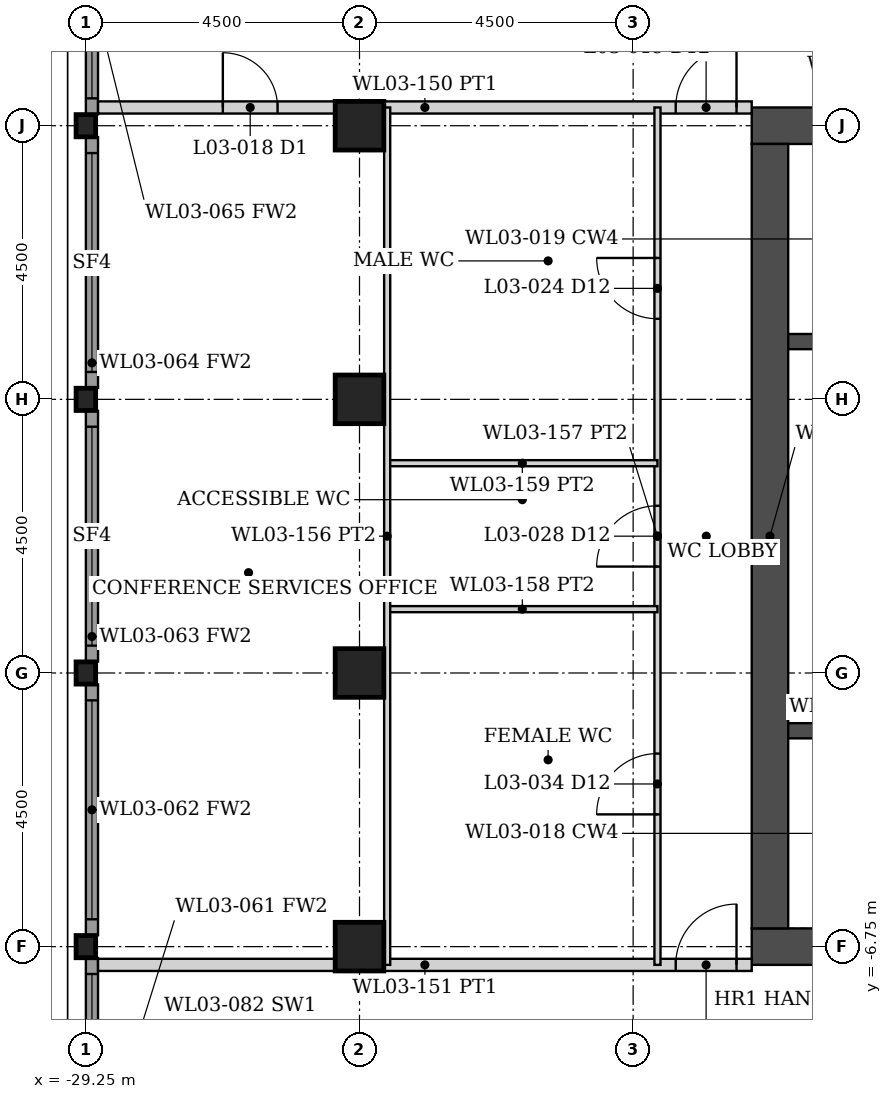
"""IFC4 building model, lengths in metres.
Left out: names, types, materials, properties, quantities, classifications, styles, units other than length and angle.
Written with IfcOpenShell. Run it as: python <this file> out.ifc"""

import sys

from ifc_helpers import new_model, si_unit, direction, frame, frame_2d, origin, origin_2d, place, context, subcontext, project, spatial, rectangle, hollow_rectangle, i_section, extrude, element, fill, save


model = new_model("IFC4")
c1 = context("Model", 3, precision=1e-05, world=origin(), true_north=direction((0.0, 1.0)))
c2 = subcontext(c1, "Body", "Model", "MODEL_VIEW")
j1 = project(units=[si_unit("LENGTHUNIT", "METRE"), si_unit("PLANEANGLEUNIT", "RADIAN")], contexts=[c1])
p1 = place(None, origin())
s1 = spatial("IfcSite", under=j1, at=p1, CompositionType="ELEMENT")
p2 = place(p1, origin())
s2 = spatial("IfcBuilding", under=s1, at=p2, CompositionType="ELEMENT")
p3 = place(p2, frame((0.0, 0.0, 16.0)))
s3 = spatial("IfcBuildingStorey", under=s2, at=p3, CompositionType="ELEMENT", Elevation=16.0)
for number, where, z_axis, x_axis in (
    (1, (-24.75, -6.75, 0.0), (0.0, 0.0, 1.0), (1.0, 0.0, 0.0)),
    (2, (-24.75, -2.25, 0.0), (0.0, 0.0, 1.0), (1.0, 0.0, 0.0)),
    (3, (-24.75, 2.25, 0.0), (0.0, 0.0, 1.0), (1.0, 0.0, 0.0)),
    (4, (-24.75, 6.75, 0.0), (0.0, 0.0, 1.0), (1.0, 0.0, 0.0)),
):
    element("IfcColumn", number, at=place(p3, frame(where, z_axis=z_axis, x_axis=x_axis)), inside=s3, PredefinedType="COLUMN", context=c2, shape_type="SweptSolid", body=[
        extrude(hollow_rectangle(XDim=0.8, YDim=0.8, WallThickness=0.08, at=origin_2d()), origin(), (0.0, 0.0, 1.0), 5.5),
    ])
for number, where, z_axis, x_axis in (
    (5, (-29.25, -6.75, 0.0), (0.0, 0.0, 1.0), (1.0, 0.0, 0.0)),
    (6, (-29.25, -2.25, 0.0), (0.0, 0.0, 1.0), (1.0, 0.0, 0.0)),
    (7, (-29.25, 2.25, 0.0), (0.0, 0.0, 1.0), (1.0, 0.0, 0.0)),
    (8, (-29.25, 6.75, 0.0), (0.0, 0.0, 1.0), (1.0, 0.0, 0.0)),
):
    element("IfcColumn", number, at=place(p3, frame(where, z_axis=z_axis, x_axis=x_axis)), inside=s3, PredefinedType="COLUMN", context=c2, shape_type="SweptSolid", body=[
        extrude(i_section(OverallWidth=0.322, OverallDepth=0.365, WebThickness=0.027, FlangeThickness=0.044, FilletRadius=0.015, at=origin_2d()), origin(), (0.0, 0.0, 1.0), 5.5),
    ])
for number, where, z_axis, x_axis in (
    (9, (-8.7, -6.75, 0.0), (0.0, 0.0, 1.0), (-1.0, 0.0, 0.0)),
    (10, (-8.7, 6.75, 0.0), (0.0, 0.0, 1.0), (-1.0, 0.0, 0.0)),
):
    element("IfcWall", number, at=place(p3, frame(where, z_axis=z_axis, x_axis=x_axis)), inside=s3, PredefinedType="SHEAR", context=c2, shape_type="SweptSolid", body=[
        extrude(rectangle(XDim=9.6, YDim=0.6, at=frame_2d((4.8, 0.0))), origin(), (0.0, 0.0, 1.0), 5.5),
    ])
p4 = place(p3, frame((-18.0, -6.45, 0.0), z_axis=(0.0, 0.0, 1.0), x_axis=(0.0, 1.0, 0.0)))
e11 = element("IfcWall", 11, at=p4, inside=s3, PredefinedType="SHEAR", context=c2, shape_type="SweptSolid", body=[
    extrude(rectangle(XDim=12.9, YDim=0.6, at=frame_2d((6.45, 0.0))), origin(), (0.0, 0.0, 1.0), 5.5),
])
p5 = place(p3, frame((-9.3, -3.2, 0.0), z_axis=(0.0, 0.0, 1.0), x_axis=(-1.0, 0.0, 0.0)))
e12 = element("IfcWall", 12, at=p5, inside=s3, PredefinedType="SHEAR", context=c2, shape_type="SweptSolid", body=[
    extrude(rectangle(XDim=8.4, YDim=0.25, at=frame_2d((4.2, 0.0))), origin(), (0.0, 0.0, 1.0), 5.5),
])
p6 = place(p5, frame((0.15, 0.0, 0.0)))
e13 = element("IfcOpeningElement", 13, at=p6, cuts=e12, PredefinedType="OPENING", context=c2, shape_type="SweptSolid", body=[
    extrude(rectangle(XDim=1.0, YDim=2.1, at=frame_2d((0.5, 1.05))), frame((0.0, 0.135, 0.0), z_axis=(0.0, -1.0, 0.0), x_axis=(1.0, 0.0, 0.0)), (0.0, 0.0, 1.0), 0.27),
])
p7 = place(p3, frame((-9.3, 3.2, 0.0), z_axis=(0.0, 0.0, 1.0), x_axis=(-1.0, 0.0, 0.0)))
e14 = element("IfcWall", 14, at=p7, inside=s3, PredefinedType="SHEAR", context=c2, shape_type="SweptSolid", body=[
    extrude(rectangle(XDim=8.4, YDim=0.25, at=frame_2d((4.2, 0.0))), origin(), (0.0, 0.0, 1.0), 5.5),
])
p8 = place(p3, frame((-29.15, -11.062, 0.0), z_axis=(0.0, 0.0, 1.0), x_axis=(0.0, 1.0, 0.0)))
e15 = element("IfcWall", 15, at=p8, inside=s3, PredefinedType="SOLIDWALL", context=c2, shape_type="SweptSolid", body=[
    extrude(rectangle(XDim=4.125, YDim=0.2, at=frame_2d((2.062, 0.0))), origin(), (0.0, 0.0, 1.0), 4.633),
])
p9 = place(p8, frame((0.262, 0.0, 0.15)))
e16 = element("IfcOpeningElement", 16, at=p9, cuts=e15, PredefinedType="OPENING", context=c2, shape_type="SweptSolid", body=[
    extrude(rectangle(XDim=3.6, YDim=4.333, at=frame_2d((1.8, 2.167))), frame((0.0, 0.11, 0.0), z_axis=(0.0, -1.0, 0.0), x_axis=(1.0, 0.0, 0.0)), (0.0, 0.0, 1.0), 0.22),
])
p10 = place(p3, frame((-29.15, -6.562, 0.0), z_axis=(0.0, 0.0, 1.0), x_axis=(0.0, 1.0, 0.0)))
e17 = element("IfcWall", 17, at=p10, inside=s3, PredefinedType="SOLIDWALL", context=c2, shape_type="SweptSolid", body=[
    extrude(rectangle(XDim=4.125, YDim=0.2, at=frame_2d((2.062, 0.0))), origin(), (0.0, 0.0, 1.0), 4.633),
])
p11 = place(p10, frame((0.262, 0.0, 0.15)))
e18 = element("IfcOpeningElement", 18, at=p11, cuts=e17, PredefinedType="OPENING", context=c2, shape_type="SweptSolid", body=[
    extrude(rectangle(XDim=3.6, YDim=4.333, at=frame_2d((1.8, 2.167))), frame((0.0, 0.11, 0.0), z_axis=(0.0, -1.0, 0.0), x_axis=(1.0, 0.0, 0.0)), (0.0, 0.0, 1.0), 0.22),
])
p12 = place(p3, frame((-29.15, -2.062, 0.0), z_axis=(0.0, 0.0, 1.0), x_axis=(0.0, 1.0, 0.0)))
e19 = element("IfcWall", 19, at=p12, inside=s3, PredefinedType="SOLIDWALL", context=c2, shape_type="SweptSolid", body=[
    extrude(rectangle(XDim=4.125, YDim=0.2, at=frame_2d((2.062, 0.0))), origin(), (0.0, 0.0, 1.0), 4.633),
])
p13 = place(p12, frame((0.262, 0.0, 0.15)))
e20 = element("IfcOpeningElement", 20, at=p13, cuts=e19, PredefinedType="OPENING", context=c2, shape_type="SweptSolid", body=[
    extrude(rectangle(XDim=3.6, YDim=4.333, at=frame_2d((1.8, 2.167))), frame((0.0, 0.11, 0.0), z_axis=(0.0, -1.0, 0.0), x_axis=(1.0, 0.0, 0.0)), (0.0, 0.0, 1.0), 0.22),
])
p14 = place(p3, frame((-29.15, 2.438, 0.0), z_axis=(0.0, 0.0, 1.0), x_axis=(0.0, 1.0, 0.0)))
e21 = element("IfcWall", 21, at=p14, inside=s3, PredefinedType="SOLIDWALL", context=c2, shape_type="SweptSolid", body=[
    extrude(rectangle(XDim=4.125, YDim=0.2, at=frame_2d((2.062, 0.0))), origin(), (0.0, 0.0, 1.0), 4.633),
])
p15 = place(p14, frame((0.262, 0.0, 0.15)))
e22 = element("IfcOpeningElement", 22, at=p15, cuts=e21, PredefinedType="OPENING", context=c2, shape_type="SweptSolid", body=[
    extrude(rectangle(XDim=3.6, YDim=4.333, at=frame_2d((1.8, 2.167))), frame((0.0, 0.11, 0.0), z_axis=(0.0, -1.0, 0.0), x_axis=(1.0, 0.0, 0.0)), (0.0, 0.0, 1.0), 0.22),
])
p16 = place(p3, frame((-29.15, 6.938, 0.0), z_axis=(0.0, 0.0, 1.0), x_axis=(0.0, 1.0, 0.0)))
e23 = element("IfcWall", 23, at=p16, inside=s3, PredefinedType="SOLIDWALL", context=c2, shape_type="SweptSolid", body=[
    extrude(rectangle(XDim=4.125, YDim=0.2, at=frame_2d((2.062, 0.0))), origin(), (0.0, 0.0, 1.0), 4.633),
])
p17 = place(p16, frame((0.262, 0.0, 0.15)))
e24 = element("IfcOpeningElement", 24, at=p17, cuts=e23, PredefinedType="OPENING", context=c2, shape_type="SweptSolid", body=[
    extrude(rectangle(XDim=3.6, YDim=4.333, at=frame_2d((1.8, 2.167))), frame((0.0, 0.11, 0.0), z_axis=(0.0, -1.0, 0.0), x_axis=(1.0, 0.0, 0.0)), (0.0, 0.0, 1.0), 0.22),
])
p18 = place(p3, frame((-29.05, 7.05, 0.0), z_axis=(0.0, 0.0, 1.0), x_axis=(1.0, 0.0, 0.0)))
e25 = element("IfcWall", 25, at=p18, inside=s3, PredefinedType="PARTITIONING", context=c2, shape_type="SweptSolid", body=[
    extrude(rectangle(XDim=10.75, YDim=0.2, at=frame_2d((5.375, 0.0))), origin(), (0.0, 0.0, 1.0), 4.329),
])
p19 = place(p18, frame((2.052, 0.0, 0.0)))
e26 = element("IfcOpeningElement", 26, at=p19, cuts=e25, PredefinedType="OPENING", context=c2, shape_type="SweptSolid", body=[
    extrude(rectangle(XDim=0.9, YDim=2.1, at=frame_2d((0.45, 1.05))), frame((0.0, 0.11, 0.0), z_axis=(0.0, -1.0, 0.0), x_axis=(1.0, 0.0, 0.0)), (0.0, 0.0, 1.0), 0.22),
])
p20 = place(p18, frame((9.5, 0.0, 0.0)))
e27 = element("IfcOpeningElement", 27, at=p20, cuts=e25, PredefinedType="OPENING", context=c2, shape_type="SweptSolid", body=[
    extrude(rectangle(XDim=1.0, YDim=2.1, at=frame_2d((0.5, 1.05))), frame((0.0, 0.11, 0.0), z_axis=(0.0, -1.0, 0.0), x_axis=(1.0, 0.0, 0.0)), (0.0, 0.0, 1.0), 0.22),
])
p21 = place(p3, frame((-29.05, -7.05, 0.0), z_axis=(0.0, 0.0, 1.0), x_axis=(1.0, 0.0, 0.0)))
e28 = element("IfcWall", 28, at=p21, inside=s3, PredefinedType="PARTITIONING", context=c2, shape_type="SweptSolid", body=[
    extrude(rectangle(XDim=10.75, YDim=0.2, at=frame_2d((5.375, 0.0))), origin(), (0.0, 0.0, 1.0), 4.329),
])
p22 = place(p21, frame((9.5, 0.0, 0.0)))
e29 = element("IfcOpeningElement", 29, at=p22, cuts=e28, PredefinedType="OPENING", context=c2, shape_type="SweptSolid", body=[
    extrude(rectangle(XDim=1.0, YDim=2.1, at=frame_2d((0.5, 1.05))), frame((0.0, 0.11, 0.0), z_axis=(0.0, -1.0, 0.0), x_axis=(1.0, 0.0, 0.0)), (0.0, 0.0, 1.0), 0.22),
])
p23 = place(p3, frame((-19.85, -7.05, 0.0), z_axis=(0.0, 0.0, 1.0), x_axis=(0.0, 1.0, 0.0)))
e30 = element("IfcWall", 30, at=p23, inside=s3, PredefinedType="PARTITIONING", context=c2, shape_type="SweptSolid", body=[
    extrude(rectangle(XDim=14.1, YDim=0.1, at=frame_2d((7.05, 0.0))), origin(), (0.0, 0.0, 1.0), 4.329),
])
p24 = place(p23, frame((2.475, 0.0, 0.0)))
e31 = element("IfcOpeningElement", 31, at=p24, cuts=e30, PredefinedType="OPENING", context=c2, shape_type="SweptSolid", body=[
    extrude(rectangle(XDim=1.0, YDim=2.1, at=frame_2d((0.5, 1.05))), frame((0.0, 0.06, 0.0), z_axis=(0.0, -1.0, 0.0), x_axis=(1.0, 0.0, 0.0)), (0.0, 0.0, 1.0), 0.12),
])
p25 = place(p23, frame((6.55, 0.0, 0.0)))
e32 = element("IfcOpeningElement", 32, at=p25, cuts=e30, PredefinedType="OPENING", context=c2, shape_type="SweptSolid", body=[
    extrude(rectangle(XDim=1.0, YDim=2.1, at=frame_2d((0.5, 1.05))), frame((0.0, 0.06, 0.0), z_axis=(0.0, -1.0, 0.0), x_axis=(1.0, 0.0, 0.0)), (0.0, 0.0, 1.0), 0.12),
])
p26 = place(p23, frame((10.625, 0.0, 0.0)))
e33 = element("IfcOpeningElement", 33, at=p26, cuts=e30, PredefinedType="OPENING", context=c2, shape_type="SweptSolid", body=[
    extrude(rectangle(XDim=1.0, YDim=2.1, at=frame_2d((0.5, 1.05))), frame((0.0, 0.06, 0.0), z_axis=(0.0, -1.0, 0.0), x_axis=(1.0, 0.0, 0.0)), (0.0, 0.0, 1.0), 0.12),
])
for number, where, z_axis, x_axis in (
    (34, (-24.295, -1.2, 0.0), (0.0, 0.0, 1.0), (1.0, 0.0, 0.0)),
    (35, (-24.295, 1.2, 0.0), (0.0, 0.0, 1.0), (1.0, 0.0, 0.0)),
):
    element("IfcWall", number, at=place(p3, frame(where, z_axis=z_axis, x_axis=x_axis)), inside=s3, PredefinedType="PARTITIONING", context=c2, shape_type="SweptSolid", body=[
        extrude(rectangle(XDim=4.445, YDim=0.1, at=frame_2d((2.222, 0.0))), origin(), (0.0, 0.0, 1.0), 4.329),
    ])
p27 = place(p3, frame((-24.295, -7.05, 0.0), z_axis=(0.0, 0.0, 1.0), x_axis=(0.0, 1.0, 0.0)))
e36 = element("IfcWall", 36, at=p27, inside=s3, PredefinedType="PARTITIONING", context=c2, shape_type="SweptSolid", body=[
    extrude(rectangle(XDim=14.1, YDim=0.1, at=frame_2d((7.05, 0.0))), origin(), (0.0, 0.0, 1.0), 4.329),
])
p28 = place(p9, origin())
e37 = element("IfcWindow", 37, at=p28, inside=s3, PartitioningType="SINGLE_PANEL", PredefinedType="WINDOW", context=c2, shape_type="SweptSolid", body=[
    extrude(rectangle(XDim=3.6, YDim=4.333, at=frame_2d((1.8, 2.167))), frame((0.0, 0.03, 0.0), z_axis=(0.0, -1.0, 0.0), x_axis=(1.0, 0.0, 0.0)), (0.0, 0.0, 1.0), 0.06),
])
fill(e16, e37)
p29 = place(p11, origin())
e38 = element("IfcWindow", 38, at=p29, inside=s3, PartitioningType="SINGLE_PANEL", PredefinedType="WINDOW", context=c2, shape_type="SweptSolid", body=[
    extrude(rectangle(XDim=3.6, YDim=4.333, at=frame_2d((1.8, 2.167))), frame((0.0, 0.03, 0.0), z_axis=(0.0, -1.0, 0.0), x_axis=(1.0, 0.0, 0.0)), (0.0, 0.0, 1.0), 0.06),
])
fill(e18, e38)
p30 = place(p13, origin())
e39 = element("IfcWindow", 39, at=p30, inside=s3, PartitioningType="SINGLE_PANEL", PredefinedType="WINDOW", context=c2, shape_type="SweptSolid", body=[
    extrude(rectangle(XDim=3.6, YDim=4.333, at=frame_2d((1.8, 2.167))), frame((0.0, 0.03, 0.0), z_axis=(0.0, -1.0, 0.0), x_axis=(1.0, 0.0, 0.0)), (0.0, 0.0, 1.0), 0.06),
])
fill(e20, e39)
p31 = place(p15, origin())
e40 = element("IfcWindow", 40, at=p31, inside=s3, PartitioningType="SINGLE_PANEL", PredefinedType="WINDOW", context=c2, shape_type="SweptSolid", body=[
    extrude(rectangle(XDim=3.6, YDim=4.333, at=frame_2d((1.8, 2.167))), frame((0.0, 0.03, 0.0), z_axis=(0.0, -1.0, 0.0), x_axis=(1.0, 0.0, 0.0)), (0.0, 0.0, 1.0), 0.06),
])
fill(e22, e40)
p32 = place(p17, origin())
e41 = element("IfcWindow", 41, at=p32, inside=s3, PartitioningType="SINGLE_PANEL", PredefinedType="WINDOW", context=c2, shape_type="SweptSolid", body=[
    extrude(rectangle(XDim=3.6, YDim=4.333, at=frame_2d((1.8, 2.167))), frame((0.0, 0.03, 0.0), z_axis=(0.0, -1.0, 0.0), x_axis=(1.0, 0.0, 0.0)), (0.0, 0.0, 1.0), 0.06),
])
fill(e24, e41)
p33 = place(p24, origin())
e42 = element("IfcDoor", 42, at=p33, inside=s3, OperationType="SINGLE_SWING_LEFT", PredefinedType="DOOR", context=c2, shape_type="SweptSolid", body=[
    extrude(rectangle(XDim=1.0, YDim=2.1, at=frame_2d((0.5, 1.05))), frame((0.0, 0.025, 0.0), z_axis=(0.0, -1.0, 0.0), x_axis=(1.0, 0.0, 0.0)), (0.0, 0.0, 1.0), 0.05),
])
fill(e31, e42)
p34 = place(p25, origin())
e43 = element("IfcDoor", 43, at=p34, inside=s3, OperationType="SINGLE_SWING_LEFT", PredefinedType="DOOR", context=c2, shape_type="SweptSolid", body=[
    extrude(rectangle(XDim=1.0, YDim=2.1, at=frame_2d((0.5, 1.05))), frame((0.0, 0.025, 0.0), z_axis=(0.0, -1.0, 0.0), x_axis=(1.0, 0.0, 0.0)), (0.0, 0.0, 1.0), 0.05),
])
fill(e32, e43)
p35 = place(p26, origin())
e44 = element("IfcDoor", 44, at=p35, inside=s3, OperationType="SINGLE_SWING_RIGHT", PredefinedType="DOOR", context=c2, shape_type="SweptSolid", body=[
    extrude(rectangle(XDim=1.0, YDim=2.1, at=frame_2d((0.5, 1.05))), frame((0.0, 0.025, 0.0), z_axis=(0.0, -1.0, 0.0), x_axis=(1.0, 0.0, 0.0)), (0.0, 0.0, 1.0), 0.05),
])
fill(e33, e44)
p36 = place(p19, origin())
e45 = element("IfcDoor", 45, at=p36, inside=s3, OperationType="SINGLE_SWING_LEFT", PredefinedType="DOOR", context=c2, shape_type="SweptSolid", body=[
    extrude(rectangle(XDim=0.9, YDim=2.1, at=frame_2d((0.45, 1.05))), frame((0.0, 0.025, 0.0), z_axis=(0.0, -1.0, 0.0), x_axis=(1.0, 0.0, 0.0)), (0.0, 0.0, 1.0), 0.05),
])
fill(e26, e45)
p37 = place(p20, origin())
e46 = element("IfcDoor", 46, at=p37, inside=s3, OperationType="SINGLE_SWING_RIGHT", PredefinedType="DOOR", context=c2, shape_type="SweptSolid", body=[
    extrude(rectangle(XDim=1.0, YDim=2.1, at=frame_2d((0.5, 1.05))), frame((0.0, 0.025, 0.0), z_axis=(0.0, -1.0, 0.0), x_axis=(1.0, 0.0, 0.0)), (0.0, 0.0, 1.0), 0.05),
])
fill(e27, e46)
p38 = place(p22, origin())
e47 = element("IfcDoor", 47, at=p38, inside=s3, OperationType="SINGLE_SWING_RIGHT", PredefinedType="DOOR", context=c2, shape_type="SweptSolid", body=[
    extrude(rectangle(XDim=1.0, YDim=2.1, at=frame_2d((0.5, 1.05))), frame((0.0, 0.025, 0.0), z_axis=(0.0, -1.0, 0.0), x_axis=(1.0, 0.0, 0.0)), (0.0, 0.0, 1.0), 0.05),
])
fill(e29, e47)
save(model, sys.argv[1])
